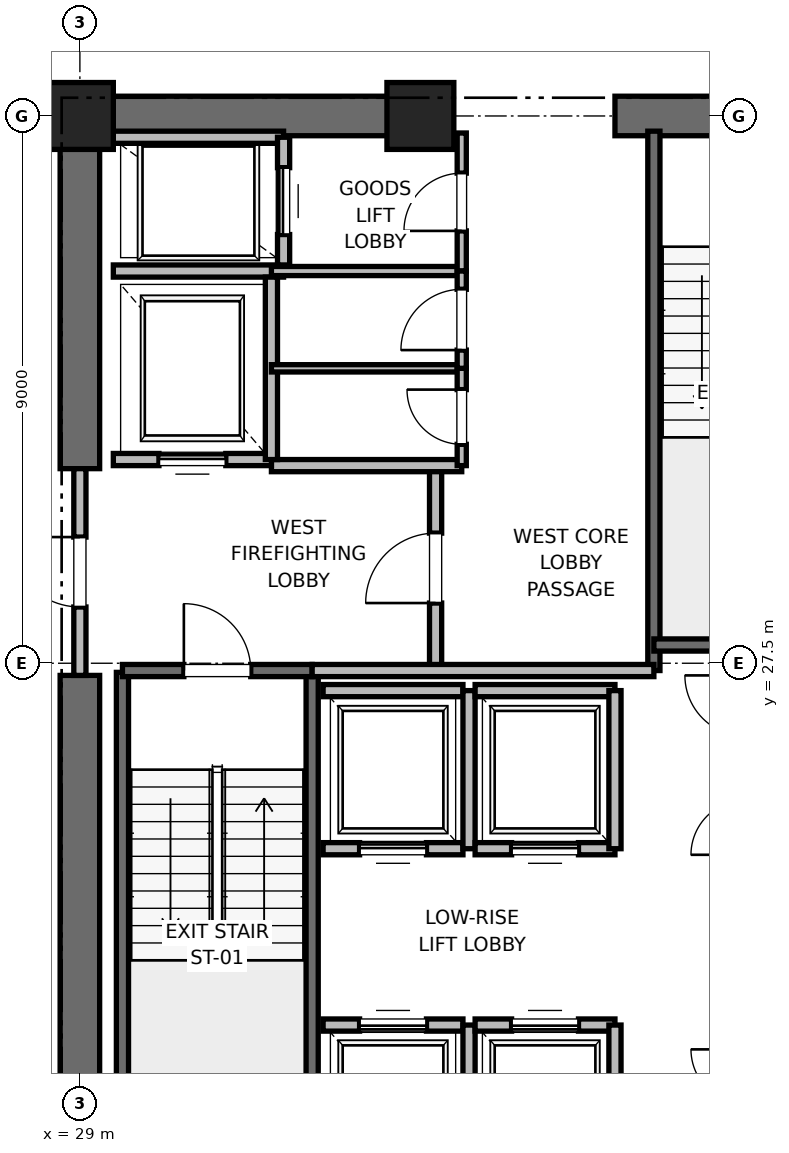
"""IFC4 building model, lengths in metres.
Left out: names, types, materials, properties, quantities, classifications, styles, units other than length and angle.
Written with IfcOpenShell. Run it as: python <this file> out.ifc"""

import sys

from ifc_helpers import new_model, si_unit, direction, frame, frame_2d, origin, origin_2d, place, context, subcontext, project, spatial, rectangle, extrude, element, fill, save


model = new_model("IFC4")
c1 = context("Model", 3, precision=1e-05, world=origin(), true_north=direction((0.0, 1.0)))
c2 = subcontext(c1, "Body", "Model", "MODEL_VIEW")
j1 = project(units=[si_unit("LENGTHUNIT", "METRE"), si_unit("PLANEANGLEUNIT", "RADIAN")], contexts=[c1])
p1 = place(None, origin())
s1 = spatial("IfcSite", under=j1, at=p1, CompositionType="ELEMENT")
p2 = place(p1, origin())
s2 = spatial("IfcBuilding", under=s1, at=p2, CompositionType="ELEMENT")
p3 = place(p2, frame((0.0, 0.0, 87.6)))
s3 = spatial("IfcBuildingStorey", under=s2, at=p3, CompositionType="ELEMENT", Elevation=87.6)
for number, where, z_axis, x_axis in (
    (1, (29.0, 36.5, 0.0), (0.0, 0.0, 1.0), (1.0, 0.0, 0.0)),
    (2, (34.6, 36.5, 0.0), (0.0, 0.0, 1.0), (1.0, 0.0, 0.0)),
):
    element("IfcColumn", number, at=place(p3, frame(where, z_axis=z_axis, x_axis=x_axis)), inside=s3, PredefinedType="PILASTER", context=c2, shape_type="SweptSolid", body=[
        extrude(rectangle(XDim=1.1, YDim=1.1, at=origin_2d()), origin(), (0.0, 0.0, 1.0), 4.0),
    ])
p4 = place(p3, frame((29.0, 36.5, 0.0), z_axis=(0.0, 0.0, 1.0), x_axis=(1.0, 0.0, 0.0)))
e3 = element("IfcWall", 3, at=p4, inside=s3, PredefinedType="SHEAR", context=c2, shape_type="SweptSolid", body=[
    extrude(rectangle(XDim=5.8, YDim=0.65, at=frame_2d((2.9, 0.0))), origin(), (0.0, 0.0, 1.0), 3.76),
])
p5 = place(p3, frame((37.8, 36.5, 0.0), z_axis=(0.0, 0.0, 1.0), x_axis=(1.0, 0.0, 0.0)))
e4 = element("IfcWall", 4, at=p5, inside=s3, PredefinedType="SHEAR", context=c2, shape_type="SweptSolid", body=[
    extrude(rectangle(XDim=4.4, YDim=0.65, at=frame_2d((2.2, 0.0))), origin(), (0.0, 0.0, 1.0), 3.76),
])
p6 = place(p5, frame((1.65, 0.0, 0.0)))
e5 = element("IfcOpeningElement", 5, at=p6, cuts=e4, PredefinedType="OPENING", context=c2, shape_type="SweptSolid", body=[
    extrude(rectangle(XDim=1.1, YDim=2.15, at=frame_2d((0.55, 1.075))), frame((0.0, 0.325, 0.0), z_axis=(0.0, -1.0, 0.0), x_axis=(1.0, 0.0, 0.0)), (0.0, 0.0, 1.0), 0.65),
])
p7 = place(p3, frame((29.0, 18.5, 0.0), z_axis=(0.0, 0.0, 1.0), x_axis=(0.0, 1.0, 0.0)))
e6 = element("IfcWall", 6, at=p7, inside=s3, PredefinedType="SHEAR", context=c2, shape_type="SweptSolid", body=[
    extrude(rectangle(XDim=8.8, YDim=0.65, at=frame_2d((4.4, 0.0))), origin(), (0.0, 0.0, 1.0), 3.76),
])
p8 = place(p3, frame((29.0, 30.7, 0.0), z_axis=(0.0, 0.0, 1.0), x_axis=(0.0, 1.0, 0.0)))
e7 = element("IfcWall", 7, at=p8, inside=s3, PredefinedType="SHEAR", context=c2, shape_type="SweptSolid", body=[
    extrude(rectangle(XDim=5.8, YDim=0.65, at=frame_2d((2.9, 0.0))), origin(), (0.0, 0.0, 1.0), 3.76),
])
p9 = place(p3, frame((29.7, 19.2, 0.0), z_axis=(0.0, 0.0, 1.0), x_axis=(0.0, 1.0, 0.0)))
e8 = element("IfcWall", 8, at=p9, inside=s3, PredefinedType="SOLIDWALL", context=c2, shape_type="SweptSolid", body=[
    extrude(rectangle(XDim=8.15, YDim=0.2, at=frame_2d((4.075, 0.0))), origin(), (0.0, 0.0, 1.0), 3.76),
])
p10 = place(p3, frame((32.82, 18.6, 0.0), z_axis=(0.0, 0.0, 1.0), x_axis=(0.0, 1.0, 0.0)))
e9 = element("IfcWall", 9, at=p10, inside=s3, PredefinedType="SOLIDWALL", context=c2, shape_type="SweptSolid", body=[
    extrude(rectangle(XDim=8.78, YDim=0.2, at=frame_2d((4.39, 0.0))), origin(), (0.0, 0.0, 1.0), 3.76),
])
p11 = place(p3, frame((29.7, 27.38, 0.0), z_axis=(0.0, 0.0, 1.0), x_axis=(1.0, 0.0, 0.0)))
e10 = element("IfcWall", 10, at=p11, inside=s3, PredefinedType="SOLIDWALL", context=c2, shape_type="SweptSolid", body=[
    extrude(rectangle(XDim=3.12, YDim=0.2, at=frame_2d((1.56, 0.0))), origin(), (0.0, 0.0, 1.0), 3.76),
])
p12 = place(p11, frame((1.01, 0.0, 0.0)))
e11 = element("IfcOpeningElement", 11, at=p12, cuts=e10, PredefinedType="OPENING", context=c2, shape_type="SweptSolid", body=[
    extrude(rectangle(XDim=1.1, YDim=2.15, at=frame_2d((0.55, 1.075))), frame((0.0, 0.1, 0.0), z_axis=(0.0, -1.0, 0.0), x_axis=(1.0, 0.0, 0.0)), (0.0, 0.0, 1.0), 0.2),
])
p13 = place(p3, frame((38.44, 27.38, 0.0), z_axis=(0.0, 0.0, 1.0), x_axis=(0.0, 1.0, 0.0)))
e12 = element("IfcWall", 12, at=p13, inside=s3, PredefinedType="SOLIDWALL", context=c2, shape_type="SweptSolid", body=[
    extrude(rectangle(XDim=8.87, YDim=0.2, at=frame_2d((4.435, 0.0))), origin(), (0.0, 0.0, 1.0), 3.76),
])
p14 = place(p3, frame((38.44, 27.8, 0.0), z_axis=(0.0, 0.0, 1.0), x_axis=(1.0, 0.0, 0.0)))
e13 = element("IfcWall", 13, at=p14, inside=s3, PredefinedType="SOLIDWALL", context=c2, shape_type="SweptSolid", body=[
    extrude(rectangle(XDim=3.32, YDim=0.2, at=frame_2d((1.66, 0.0))), origin(), (0.0, 0.0, 1.0), 3.76),
])
p15 = place(p3, frame((34.85, 27.38, 0.0), z_axis=(0.0, 0.0, 1.0), x_axis=(0.0, 1.0, 0.0)))
e14 = element("IfcWall", 14, at=p15, inside=s3, PredefinedType="PARTITIONING", context=c2, shape_type="SweptSolid", body=[
    extrude(rectangle(XDim=3.37, YDim=0.2, at=frame_2d((1.685, 0.0))), origin(), (0.0, 0.0, 1.0), 3.76),
])
p16 = place(p15, frame((1.11, 0.0, 0.0)))
e15 = element("IfcOpeningElement", 15, at=p16, cuts=e14, PredefinedType="OPENING", context=c2, shape_type="SweptSolid", body=[
    extrude(rectangle(XDim=1.15, YDim=2.2, at=frame_2d((0.575, 1.1))), frame((0.0, 0.1, 0.0), z_axis=(0.0, -1.0, 0.0), x_axis=(1.0, 0.0, 0.0)), (0.0, 0.0, 1.0), 0.2),
])
p17 = place(p3, frame((29.0, 27.3, 0.0), z_axis=(0.0, 0.0, 1.0), x_axis=(0.0, 1.0, 0.0)))
e16 = element("IfcWall", 16, at=p17, inside=s3, PredefinedType="PARTITIONING", context=c2, shape_type="SweptSolid", body=[
    extrude(rectangle(XDim=3.4, YDim=0.2, at=frame_2d((1.7, 0.0))), origin(), (0.0, 0.0, 1.0), 2.54),
])
p18 = place(p17, frame((1.125, 0.0, 0.0)))
e17 = element("IfcOpeningElement", 17, at=p18, cuts=e16, PredefinedType="OPENING", context=c2, shape_type="SweptSolid", body=[
    extrude(rectangle(XDim=1.15, YDim=2.2, at=frame_2d((0.575, 1.1))), frame((0.0, 0.1, 0.0), z_axis=(0.0, -1.0, 0.0), x_axis=(1.0, 0.0, 0.0)), (0.0, 0.0, 1.0), 0.2),
])
p19 = place(p3, frame((32.82, 27.38, 0.0), z_axis=(0.0, 0.0, 1.0), x_axis=(1.0, 0.0, 0.0)))
e18 = element("IfcWall", 18, at=p19, inside=s3, PredefinedType="PARTITIONING", context=c2, shape_type="SweptSolid", body=[
    extrude(rectangle(XDim=5.62, YDim=0.2, at=frame_2d((2.81, 0.0))), origin(), (0.0, 0.0, 1.0), 3.76),
])
p20 = place(p3, frame((32.15, 30.75, 0.0), z_axis=(0.0, 0.0, 1.0), x_axis=(1.0, 0.0, 0.0)))
e19 = element("IfcWall", 19, at=p20, inside=s3, PredefinedType="PARTITIONING", context=c2, shape_type="SweptSolid", body=[
    extrude(rectangle(XDim=3.13, YDim=0.2, at=frame_2d((1.565, 0.0))), origin(), (0.0, 0.0, 1.0), 3.76),
])
p21 = place(p3, frame((29.55, 30.85, 0.0), z_axis=(0.0, 0.0, 1.0), x_axis=(1.0, 0.0, 0.0)))
e20 = element("IfcWall", 20, at=p21, inside=s3, PredefinedType="SOLIDWALL", context=c2, shape_type="SweptSolid", body=[
    extrude(rectangle(XDim=2.6, YDim=0.2, at=frame_2d((1.3, 0.0))), origin(), (0.0, 0.0, 1.0), 2.54),
])
p22 = place(p21, frame((0.75, 0.0, 0.0)))
e21 = element("IfcOpeningElement", 21, at=p22, cuts=e20, PredefinedType="OPENING", context=c2, shape_type="SweptSolid", body=[
    extrude(rectangle(XDim=1.1, YDim=2.2, at=frame_2d((0.55, 1.1))), frame((0.0, 0.1, 0.0), z_axis=(0.0, -1.0, 0.0), x_axis=(1.0, 0.0, 0.0)), (0.0, 0.0, 1.0), 0.2),
])
p23 = place(p3, frame((29.55, 33.95, 0.0), z_axis=(0.0, 0.0, 1.0), x_axis=(1.0, 0.0, 0.0)))
e22 = element("IfcWall", 22, at=p23, inside=s3, PredefinedType="SOLIDWALL", context=c2, shape_type="SweptSolid", body=[
    extrude(rectangle(XDim=2.8, YDim=0.2, at=frame_2d((1.4, 0.0))), origin(), (0.0, 0.0, 1.0), 3.76),
])
p24 = place(p3, frame((32.15, 30.85, 0.0), z_axis=(0.0, 0.0, 1.0), x_axis=(0.0, 1.0, 0.0)))
e23 = element("IfcWall", 23, at=p24, inside=s3, PredefinedType="SOLIDWALL", context=c2, shape_type="SweptSolid", body=[
    extrude(rectangle(XDim=3.0, YDim=0.2, at=frame_2d((1.5, 0.0))), origin(), (0.0, 0.0, 1.0), 3.76),
])
p25 = place(p3, frame((32.35, 36.15, 0.0), z_axis=(0.0, 0.0, 1.0), x_axis=(-1.0, 0.0, 0.0)))
e24 = element("IfcWall", 24, at=p25, inside=s3, PredefinedType="SOLIDWALL", context=c2, shape_type="SweptSolid", body=[
    extrude(rectangle(XDim=2.8, YDim=0.2, at=frame_2d((1.4, 0.0))), origin(), (0.0, 0.0, 1.0), 2.889),
])
p26 = place(p3, frame((32.35, 34.05, 0.0), z_axis=(0.0, 0.0, 1.0), x_axis=(0.0, 1.0, 0.0)))
e25 = element("IfcWall", 25, at=p26, inside=s3, PredefinedType="SOLIDWALL", context=c2, shape_type="SweptSolid", body=[
    extrude(rectangle(XDim=2.1, YDim=0.2, at=frame_2d((1.05, 0.0))), origin(), (0.0, 0.0, 1.0), 3.76),
])
p27 = place(p26, frame((0.5, 0.0, 0.0)))
e26 = element("IfcOpeningElement", 26, at=p27, cuts=e25, PredefinedType="OPENING", context=c2, shape_type="SweptSolid", body=[
    extrude(rectangle(XDim=1.1, YDim=2.2, at=frame_2d((0.55, 1.1))), frame((0.0, 0.1, 0.0), z_axis=(0.0, -1.0, 0.0), x_axis=(1.0, 0.0, 0.0)), (0.0, 0.0, 1.0), 0.2),
])
p28 = place(p3, frame((35.3, 21.55, 0.0), z_axis=(0.0, 0.0, 1.0), x_axis=(-1.0, 0.0, 0.0)))
e27 = element("IfcWall", 27, at=p28, inside=s3, PredefinedType="SOLIDWALL", context=c2, shape_type="SweptSolid", body=[
    extrude(rectangle(XDim=2.3, YDim=0.2, at=frame_2d((1.15, 0.0))), origin(), (0.0, 0.0, 1.0), 3.76),
])
p29 = place(p28, frame((0.6, 0.0, 0.0)))
e28 = element("IfcOpeningElement", 28, at=p29, cuts=e27, PredefinedType="OPENING", context=c2, shape_type="SweptSolid", body=[
    extrude(rectangle(XDim=1.1, YDim=2.2, at=frame_2d((0.55, 1.1))), frame((0.0, 0.1, 0.0), z_axis=(0.0, -1.0, 0.0), x_axis=(1.0, 0.0, 0.0)), (0.0, 0.0, 1.0), 0.2),
])
p30 = place(p3, frame((35.4, 18.95, 0.0), z_axis=(0.0, 0.0, 1.0), x_axis=(0.0, 1.0, 0.0)))
e29 = element("IfcWall", 29, at=p30, inside=s3, PredefinedType="SOLIDWALL", context=c2, shape_type="SweptSolid", body=[
    extrude(rectangle(XDim=2.6, YDim=0.2, at=frame_2d((1.3, 0.0))), origin(), (0.0, 0.0, 1.0), 3.76),
])
p31 = place(p3, frame((37.8, 21.55, 0.0), z_axis=(0.0, 0.0, 1.0), x_axis=(-1.0, 0.0, 0.0)))
e30 = element("IfcWall", 30, at=p31, inside=s3, PredefinedType="SOLIDWALL", context=c2, shape_type="SweptSolid", body=[
    extrude(rectangle(XDim=2.3, YDim=0.2, at=frame_2d((1.15, 0.0))), origin(), (0.0, 0.0, 1.0), 3.76),
])
p32 = place(p31, frame((0.6, 0.0, 0.0)))
e31 = element("IfcOpeningElement", 31, at=p32, cuts=e30, PredefinedType="OPENING", context=c2, shape_type="SweptSolid", body=[
    extrude(rectangle(XDim=1.1, YDim=2.2, at=frame_2d((0.55, 1.1))), frame((0.0, 0.1, 0.0), z_axis=(0.0, -1.0, 0.0), x_axis=(1.0, 0.0, 0.0)), (0.0, 0.0, 1.0), 0.2),
])
p33 = place(p3, frame((37.8, 18.95, 0.0), z_axis=(0.0, 0.0, 1.0), x_axis=(0.0, 1.0, 0.0)))
e32 = element("IfcWall", 32, at=p33, inside=s3, PredefinedType="SOLIDWALL", context=c2, shape_type="SweptSolid", body=[
    extrude(rectangle(XDim=2.6, YDim=0.2, at=frame_2d((1.3, 0.0))), origin(), (0.0, 0.0, 1.0), 2.54),
])
p34 = place(p3, frame((33.0, 24.45, 0.0), z_axis=(0.0, 0.0, 1.0), x_axis=(1.0, 0.0, 0.0)))
e33 = element("IfcWall", 33, at=p34, inside=s3, PredefinedType="SOLIDWALL", context=c2, shape_type="SweptSolid", body=[
    extrude(rectangle(XDim=2.3, YDim=0.2, at=frame_2d((1.15, 0.0))), origin(), (0.0, 0.0, 1.0), 3.76),
])
p35 = place(p34, frame((0.6, 0.0, 0.0)))
e34 = element("IfcOpeningElement", 34, at=p35, cuts=e33, PredefinedType="OPENING", context=c2, shape_type="SweptSolid", body=[
    extrude(rectangle(XDim=1.1, YDim=2.2, at=frame_2d((0.55, 1.1))), frame((0.0, 0.1, 0.0), z_axis=(0.0, -1.0, 0.0), x_axis=(1.0, 0.0, 0.0)), (0.0, 0.0, 1.0), 0.2),
])
p36 = place(p3, frame((35.3, 27.05, 0.0), z_axis=(0.0, 0.0, 1.0), x_axis=(-1.0, 0.0, 0.0)))
e35 = element("IfcWall", 35, at=p36, inside=s3, PredefinedType="SOLIDWALL", context=c2, shape_type="SweptSolid", body=[
    extrude(rectangle(XDim=2.3, YDim=0.2, at=frame_2d((1.15, 0.0))), origin(), (0.0, 0.0, 1.0), 3.76),
])
p37 = place(p3, frame((35.4, 24.45, 0.0), z_axis=(0.0, 0.0, 1.0), x_axis=(0.0, 1.0, 0.0)))
e36 = element("IfcWall", 36, at=p37, inside=s3, PredefinedType="SOLIDWALL", context=c2, shape_type="SweptSolid", body=[
    extrude(rectangle(XDim=2.6, YDim=0.2, at=frame_2d((1.3, 0.0))), origin(), (0.0, 0.0, 1.0), 3.76),
])
p38 = place(p3, frame((35.5, 24.45, 0.0), z_axis=(0.0, 0.0, 1.0), x_axis=(1.0, 0.0, 0.0)))
e37 = element("IfcWall", 37, at=p38, inside=s3, PredefinedType="SOLIDWALL", context=c2, shape_type="SweptSolid", body=[
    extrude(rectangle(XDim=2.3, YDim=0.2, at=frame_2d((1.15, 0.0))), origin(), (0.0, 0.0, 1.0), 3.76),
])
p39 = place(p38, frame((0.6, 0.0, 0.0)))
e38 = element("IfcOpeningElement", 38, at=p39, cuts=e37, PredefinedType="OPENING", context=c2, shape_type="SweptSolid", body=[
    extrude(rectangle(XDim=1.1, YDim=2.2, at=frame_2d((0.55, 1.1))), frame((0.0, 0.1, 0.0), z_axis=(0.0, -1.0, 0.0), x_axis=(1.0, 0.0, 0.0)), (0.0, 0.0, 1.0), 0.2),
])
p40 = place(p3, frame((37.8, 27.05, 0.0), z_axis=(0.0, 0.0, 1.0), x_axis=(-1.0, 0.0, 0.0)))
e39 = element("IfcWall", 39, at=p40, inside=s3, PredefinedType="SOLIDWALL", context=c2, shape_type="SweptSolid", body=[
    extrude(rectangle(XDim=2.3, YDim=0.2, at=frame_2d((1.15, 0.0))), origin(), (0.0, 0.0, 1.0), 3.76),
])
p41 = place(p3, frame((37.8, 24.45, 0.0), z_axis=(0.0, 0.0, 1.0), x_axis=(0.0, 1.0, 0.0)))
e40 = element("IfcWall", 40, at=p41, inside=s3, PredefinedType="SOLIDWALL", context=c2, shape_type="SweptSolid", body=[
    extrude(rectangle(XDim=2.6, YDim=0.2, at=frame_2d((1.3, 0.0))), origin(), (0.0, 0.0, 1.0), 3.76),
])
p42 = place(p3, frame((32.15, 33.95, 0.0), z_axis=(0.0, 0.0, 1.0), x_axis=(1.0, 0.0, 0.0)))
e41 = element("IfcWall", 41, at=p42, inside=s3, PredefinedType="PARTITIONING", context=c2, shape_type="SweptSolid", body=[
    extrude(rectangle(XDim=3.13, YDim=0.15, at=frame_2d((1.565, 0.0))), origin(), (0.0, 0.0, 1.0), 2.85),
])
p43 = place(p3, frame((35.28, 33.95, 0.0), z_axis=(0.0, 0.0, 1.0), x_axis=(0.0, 1.0, 0.0)))
e42 = element("IfcWall", 42, at=p43, inside=s3, PredefinedType="PARTITIONING", context=c2, shape_type="SweptSolid", body=[
    extrude(rectangle(XDim=2.27, YDim=0.15, at=frame_2d((1.135, 0.0))), origin(), (0.0, 0.0, 1.0), 2.54),
])
p44 = place(p43, frame((0.66, 0.0, 0.0)))
e43 = element("IfcOpeningElement", 43, at=p44, cuts=e42, PredefinedType="OPENING", context=c2, shape_type="SweptSolid", body=[
    extrude(rectangle(XDim=0.95, YDim=2.15, at=frame_2d((0.475, 1.075))), frame((0.0, 0.075, 0.0), z_axis=(0.0, -1.0, 0.0), x_axis=(1.0, 0.0, 0.0)), (0.0, 0.0, 1.0), 0.15),
])
p45 = place(p3, frame((32.15, 32.35, 0.0), z_axis=(0.0, 0.0, 1.0), x_axis=(1.0, 0.0, 0.0)))
e44 = element("IfcWall", 44, at=p45, inside=s3, PredefinedType="PARTITIONING", context=c2, shape_type="SweptSolid", body=[
    extrude(rectangle(XDim=3.13, YDim=0.12, at=frame_2d((1.565, 0.0))), origin(), (0.0, 0.0, 1.0), 2.85),
])
p46 = place(p3, frame((35.28, 30.75, 0.0), z_axis=(0.0, 0.0, 1.0), x_axis=(0.0, 1.0, 0.0)))
e45 = element("IfcWall", 45, at=p46, inside=s3, PredefinedType="PARTITIONING", context=c2, shape_type="SweptSolid", body=[
    extrude(rectangle(XDim=1.6, YDim=0.15, at=frame_2d((0.8, 0.0))), origin(), (0.0, 0.0, 1.0), 2.85),
])
p47 = place(p46, frame((0.35, 0.0, 0.0)))
e46 = element("IfcOpeningElement", 46, at=p47, cuts=e45, PredefinedType="OPENING", context=c2, shape_type="SweptSolid", body=[
    extrude(rectangle(XDim=0.9, YDim=2.1, at=frame_2d((0.45, 1.05))), frame((0.0, 0.075, 0.0), z_axis=(0.0, -1.0, 0.0), x_axis=(1.0, 0.0, 0.0)), (0.0, 0.0, 1.0), 0.15),
])
p48 = place(p3, frame((35.28, 32.35, 0.0), z_axis=(0.0, 0.0, 1.0), x_axis=(0.0, 1.0, 0.0)))
e47 = element("IfcWall", 47, at=p48, inside=s3, PredefinedType="PARTITIONING", context=c2, shape_type="SweptSolid", body=[
    extrude(rectangle(XDim=1.6, YDim=0.15, at=frame_2d((0.8, 0.0))), origin(), (0.0, 0.0, 1.0), 2.85),
])
p49 = place(p48, frame((0.3, 0.0, 0.0)))
e48 = element("IfcOpeningElement", 48, at=p49, cuts=e47, PredefinedType="OPENING", context=c2, shape_type="SweptSolid", body=[
    extrude(rectangle(XDim=1.0, YDim=2.15, at=frame_2d((0.5, 1.075))), frame((0.0, 0.075, 0.0), z_axis=(0.0, -1.0, 0.0), x_axis=(1.0, 0.0, 0.0)), (0.0, 0.0, 1.0), 0.15),
])
p50 = place(p12, origin())
e49 = element("IfcDoor", 49, at=p50, inside=s3, OperationType="SINGLE_SWING_LEFT", PredefinedType="DOOR", context=c2, shape_type="SweptSolid", body=[
    extrude(rectangle(XDim=1.1, YDim=2.15, at=frame_2d((0.55, 1.075))), frame((0.0, 0.025, 0.0), z_axis=(0.0, -1.0, 0.0), x_axis=(1.0, 0.0, 0.0)), (0.0, 0.0, 1.0), 0.05),
])
fill(e11, e49)
p51 = place(p16, origin())
e50 = element("IfcDoor", 50, at=p51, inside=s3, OperationType="SINGLE_SWING_LEFT", PredefinedType="DOOR", context=c2, shape_type="SweptSolid", body=[
    extrude(rectangle(XDim=1.15, YDim=2.2, at=frame_2d((0.575, 1.1))), frame((0.0, 0.025, 0.0), z_axis=(0.0, -1.0, 0.0), x_axis=(1.0, 0.0, 0.0)), (0.0, 0.0, 1.0), 0.05),
])
fill(e15, e50)
p52 = place(p18, origin())
e51 = element("IfcDoor", 51, at=p52, inside=s3, OperationType="SINGLE_SWING_RIGHT", PredefinedType="DOOR", context=c2, shape_type="SweptSolid", body=[
    extrude(rectangle(XDim=1.15, YDim=2.2, at=frame_2d((0.575, 1.1))), frame((0.0, 0.025, 0.0), z_axis=(0.0, -1.0, 0.0), x_axis=(1.0, 0.0, 0.0)), (0.0, 0.0, 1.0), 0.05),
])
fill(e17, e51)
p53 = place(p22, origin())
e52 = element("IfcDoor", 52, at=p53, inside=s3, OperationType="SLIDING_TO_RIGHT", PredefinedType="DOOR", context=c2, shape_type="SweptSolid", body=[
    extrude(rectangle(XDim=1.1, YDim=2.2, at=frame_2d((0.55, 1.1))), frame((0.0, 0.025, 0.0), z_axis=(0.0, -1.0, 0.0), x_axis=(1.0, 0.0, 0.0)), (0.0, 0.0, 1.0), 0.05),
])
fill(e21, e52)
p54 = place(p27, origin())
e53 = element("IfcDoor", 53, at=p54, inside=s3, OperationType="SLIDING_TO_RIGHT", PredefinedType="DOOR", context=c2, shape_type="SweptSolid", body=[
    extrude(rectangle(XDim=1.1, YDim=2.2, at=frame_2d((0.55, 1.1))), frame((0.0, 0.025, 0.0), z_axis=(0.0, -1.0, 0.0), x_axis=(1.0, 0.0, 0.0)), (0.0, 0.0, 1.0), 0.05),
])
fill(e26, e53)
p55 = place(p29, origin())
e54 = element("IfcDoor", 54, at=p55, inside=s3, OperationType="SLIDING_TO_RIGHT", PredefinedType="DOOR", context=c2, shape_type="SweptSolid", body=[
    extrude(rectangle(XDim=1.1, YDim=2.2, at=frame_2d((0.55, 1.1))), frame((0.0, 0.025, 0.0), z_axis=(0.0, -1.0, 0.0), x_axis=(1.0, 0.0, 0.0)), (0.0, 0.0, 1.0), 0.05),
])
fill(e28, e54)
p56 = place(p32, origin())
e55 = element("IfcDoor", 55, at=p56, inside=s3, OperationType="SLIDING_TO_RIGHT", PredefinedType="DOOR", context=c2, shape_type="SweptSolid", body=[
    extrude(rectangle(XDim=1.1, YDim=2.2, at=frame_2d((0.55, 1.1))), frame((0.0, 0.025, 0.0), z_axis=(0.0, -1.0, 0.0), x_axis=(1.0, 0.0, 0.0)), (0.0, 0.0, 1.0), 0.05),
])
fill(e31, e55)
p57 = place(p35, origin())
e56 = element("IfcDoor", 56, at=p57, inside=s3, OperationType="SLIDING_TO_RIGHT", PredefinedType="DOOR", context=c2, shape_type="SweptSolid", body=[
    extrude(rectangle(XDim=1.1, YDim=2.2, at=frame_2d((0.55, 1.1))), frame((0.0, 0.025, 0.0), z_axis=(0.0, -1.0, 0.0), x_axis=(1.0, 0.0, 0.0)), (0.0, 0.0, 1.0), 0.05),
])
fill(e34, e56)
p58 = place(p39, origin())
e57 = element("IfcDoor", 57, at=p58, inside=s3, OperationType="SLIDING_TO_RIGHT", PredefinedType="DOOR", context=c2, shape_type="SweptSolid", body=[
    extrude(rectangle(XDim=1.1, YDim=2.2, at=frame_2d((0.55, 1.1))), frame((0.0, 0.025, 0.0), z_axis=(0.0, -1.0, 0.0), x_axis=(1.0, 0.0, 0.0)), (0.0, 0.0, 1.0), 0.05),
])
fill(e38, e57)
p59 = place(p44, origin())
e58 = element("IfcDoor", 58, at=p59, inside=s3, OperationType="SINGLE_SWING_LEFT", PredefinedType="DOOR", context=c2, shape_type="SweptSolid", body=[
    extrude(rectangle(XDim=0.95, YDim=2.15, at=frame_2d((0.475, 1.075))), frame((0.0, 0.025, 0.0), z_axis=(0.0, -1.0, 0.0), x_axis=(1.0, 0.0, 0.0)), (0.0, 0.0, 1.0), 0.05),
])
fill(e43, e58)
p60 = place(p47, origin())
e59 = element("IfcDoor", 59, at=p60, inside=s3, OperationType="SINGLE_SWING_RIGHT", PredefinedType="DOOR", context=c2, shape_type="SweptSolid", body=[
    extrude(rectangle(XDim=0.9, YDim=2.1, at=frame_2d((0.45, 1.05))), frame((0.0, 0.025, 0.0), z_axis=(0.0, -1.0, 0.0), x_axis=(1.0, 0.0, 0.0)), (0.0, 0.0, 1.0), 0.05),
])
fill(e46, e59)
p61 = place(p49, origin())
e60 = element("IfcDoor", 60, at=p61, inside=s3, OperationType="SINGLE_SWING_LEFT", PredefinedType="DOOR", context=c2, shape_type="SweptSolid", body=[
    extrude(rectangle(XDim=1.0, YDim=2.15, at=frame_2d((0.5, 1.075))), frame((0.0, 0.025, 0.0), z_axis=(0.0, -1.0, 0.0), x_axis=(1.0, 0.0, 0.0)), (0.0, 0.0, 1.0), 0.05),
])
fill(e48, e60)
save(model, sys.argv[1])
